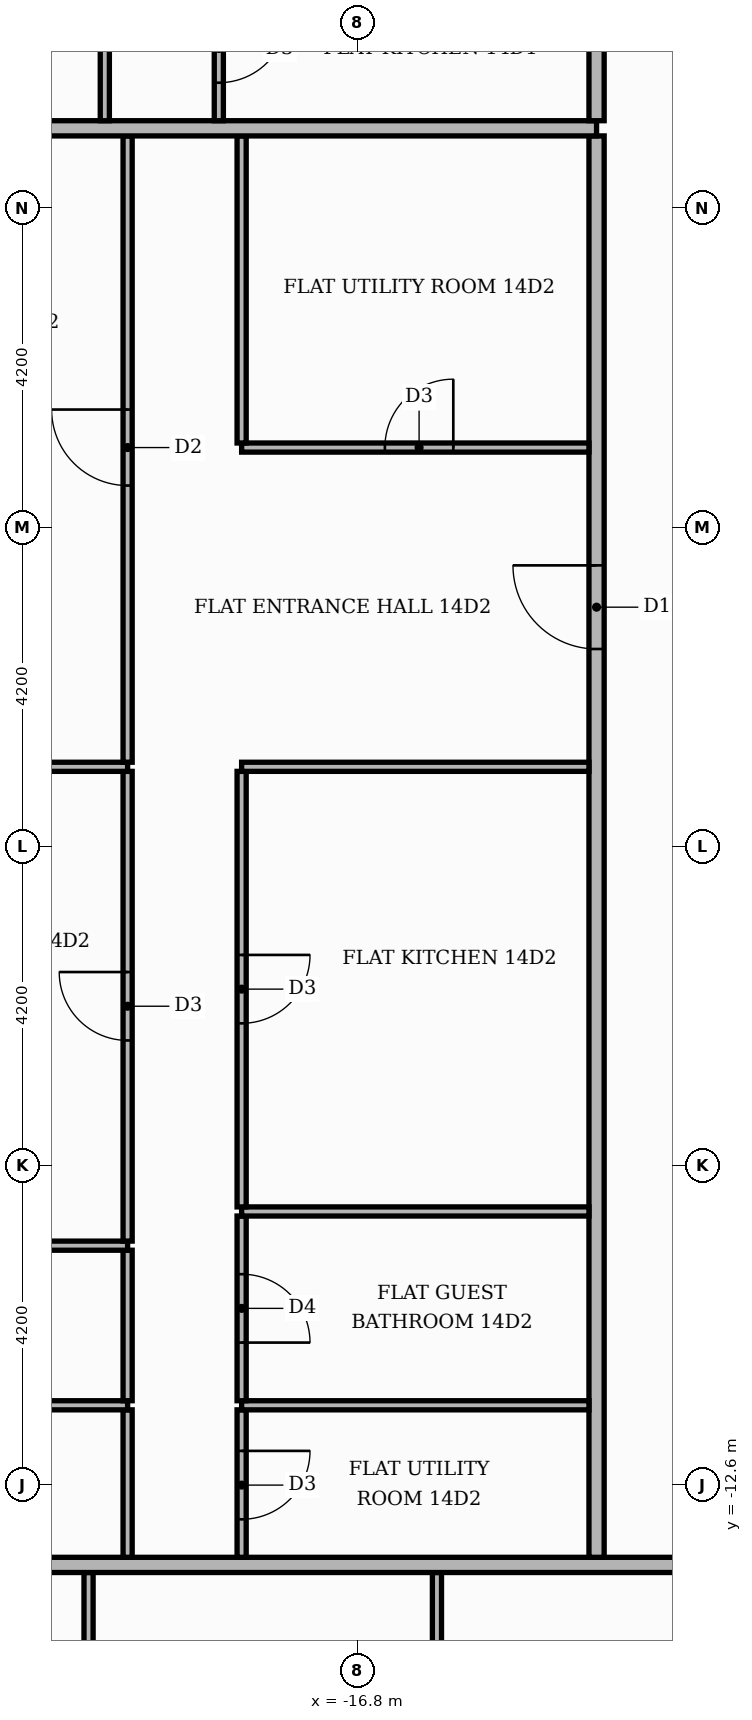
"""IFC4 building model, lengths in metres.
Left out: names, types, materials, properties, quantities, classifications, styles, units other than length and angle.
Written with IfcOpenShell. Run it as: python <this file> out.ifc"""

import sys

from ifc_helpers import new_model, si_unit, direction, frame, frame_2d, origin, place, context, subcontext, project, spatial, rectangle, extrude, element, fill, save


model = new_model("IFC4")
c1 = context("Model", 3, precision=1e-05, world=origin(), true_north=direction((0.0, 1.0)))
c2 = subcontext(c1, "Body", "Model", "MODEL_VIEW")
j1 = project(units=[si_unit("LENGTHUNIT", "METRE"), si_unit("PLANEANGLEUNIT", "RADIAN")], contexts=[c1])
p1 = place(None, origin())
s1 = spatial("IfcSite", under=j1, at=p1, CompositionType="ELEMENT")
p2 = place(p1, origin())
s2 = spatial("IfcBuilding", under=s1, at=p2, CompositionType="ELEMENT")
p3 = place(p2, frame((0.0, 0.0, 62.1)))
s3 = spatial("IfcBuildingStorey", under=s2, at=p3, CompositionType="ELEMENT", Elevation=62.1)
p4 = place(p3, frame((-20.334, -20.66, 0.0), z_axis=(0.0, 0.0, 1.0), x_axis=(0.0, 1.0, 0.0)))
e1 = element("IfcWall", 1, at=p4, inside=s3, PredefinedType="PARTITIONING", context=c2, shape_type="SweptSolid", body=[
    extrude(rectangle(XDim=6.91, YDim=0.12, at=frame_2d((3.455, 0.0))), origin(), (0.0, 0.0, 1.0), 3.48),
])
p5 = place(p4, frame((4.792, 0.0, 0.0)))
e2 = element("IfcOpeningElement", 2, at=p5, cuts=e1, PredefinedType="OPENING", context=c2, shape_type="SweptSolid", body=[
    extrude(rectangle(XDim=0.9, YDim=2.1, at=frame_2d((0.45, 1.05))), frame((0.0, 0.07, 0.0), z_axis=(0.0, -1.0, 0.0), x_axis=(1.0, 0.0, 0.0)), (0.0, 0.0, 1.0), 0.14),
])
p6 = place(p3, frame((-15.75, -20.66, 0.0), z_axis=(0.0, 0.0, 1.0), x_axis=(0.0, 1.0, 0.0)))
e3 = element("IfcWall", 3, at=p6, inside=s3, PredefinedType="PARTITIONING", context=c2, shape_type="SweptSolid", body=[
    extrude(rectangle(XDim=6.91, YDim=0.12, at=frame_2d((3.455, 0.0))), origin(), (0.0, 0.0, 1.0), 3.48),
])
p7 = place(p6, frame((2.975, 0.0, 0.0)))
e4 = element("IfcOpeningElement", 4, at=p7, cuts=e3, PredefinedType="OPENING", context=c2, shape_type="SweptSolid", body=[
    extrude(rectangle(XDim=1.0, YDim=2.1, at=frame_2d((0.5, 1.05))), frame((0.0, 0.07, 0.0), z_axis=(0.0, -1.0, 0.0), x_axis=(1.0, 0.0, 0.0)), (0.0, 0.0, 1.0), 0.14),
])
p8 = place(p3, frame((-25.42, -13.65, 0.0), z_axis=(0.0, 0.0, 1.0), x_axis=(1.0, 0.0, 0.0)))
e5 = element("IfcWall", 5, at=p8, inside=s3, PredefinedType="PARTITIONING", context=c2, shape_type="SweptSolid", body=[
    extrude(rectangle(XDim=39.07, YDim=0.2, at=frame_2d((19.535, 0.0))), origin(), (0.0, 0.0, 1.0), 3.48),
])
p9 = place(p8, frame((13.32, 0.0, 0.0)))
e6 = element("IfcOpeningElement", 6, at=p9, cuts=e5, PredefinedType="OPENING", context=c2, shape_type="SweptSolid", body=[
    extrude(rectangle(XDim=1.1, YDim=2.4, at=frame_2d((0.55, 1.2))), frame((0.0, 0.11, 0.0), z_axis=(0.0, -1.0, 0.0), x_axis=(1.0, 0.0, 0.0)), (0.0, 0.0, 1.0), 0.22),
])
p10 = place(p8, frame((21.72, 0.0, 0.0)))
e7 = element("IfcOpeningElement", 7, at=p10, cuts=e5, PredefinedType="OPENING", context=c2, shape_type="SweptSolid", body=[
    extrude(rectangle(XDim=1.1, YDim=2.4, at=frame_2d((0.55, 1.2))), frame((0.0, 0.11, 0.0), z_axis=(0.0, -1.0, 0.0), x_axis=(1.0, 0.0, 0.0)), (0.0, 0.0, 1.0), 0.22),
])
p11 = place(p3, frame((-19.82, -13.55, 0.0), z_axis=(0.0, 0.0, 1.0), x_axis=(0.0, 1.0, 0.0)))
e8 = element("IfcWall", 8, at=p11, inside=s3, PredefinedType="PARTITIONING", context=c2, shape_type="SweptSolid", body=[
    extrude(rectangle(XDim=1.94, YDim=0.12, at=frame_2d((0.97, 0.0))), origin(), (0.0, 0.0, 1.0), 3.48),
])
p12 = place(p3, frame((-18.32, -13.55, 0.0), z_axis=(0.0, 0.0, 1.0), x_axis=(0.0, 1.0, 0.0)))
e9 = element("IfcWall", 9, at=p12, inside=s3, PredefinedType="PARTITIONING", context=c2, shape_type="SweptSolid", body=[
    extrude(rectangle(XDim=1.94, YDim=0.12, at=frame_2d((0.97, 0.0))), origin(), (0.0, 0.0, 1.0), 3.48),
])
p13 = place(p12, frame((0.5, 0.0, 0.0)))
e10 = element("IfcOpeningElement", 10, at=p13, cuts=e9, PredefinedType="OPENING", context=c2, shape_type="SweptSolid", body=[
    extrude(rectangle(XDim=0.9, YDim=2.1, at=frame_2d((0.45, 1.05))), frame((0.0, 0.07, 0.0), z_axis=(0.0, -1.0, 0.0), x_axis=(1.0, 0.0, 0.0)), (0.0, 0.0, 1.0), 0.14),
])
p14 = place(p3, frame((-13.65, -13.55, 0.0), z_axis=(0.0, 0.0, 1.0), x_axis=(0.0, 1.0, 0.0)))
e11 = element("IfcWall", 11, at=p14, inside=s3, PredefinedType="PARTITIONING", context=c2, shape_type="SweptSolid", body=[
    extrude(rectangle(XDim=18.7, YDim=0.2, at=frame_2d((9.35, 0.0))), origin(), (0.0, 0.0, 1.0), 3.48),
])
p15 = place(p14, frame((11.95, 0.0, 0.0)))
e12 = element("IfcOpeningElement", 12, at=p15, cuts=e11, PredefinedType="OPENING", context=c2, shape_type="SweptSolid", body=[
    extrude(rectangle(XDim=1.1, YDim=2.4, at=frame_2d((0.55, 1.2))), frame((0.0, 0.11, 0.0), z_axis=(0.0, -1.0, 0.0), x_axis=(1.0, 0.0, 0.0)), (0.0, 0.0, 1.0), 0.22),
])
p16 = place(p3, frame((-25.42, -11.55, 0.0), z_axis=(0.0, 0.0, 1.0), x_axis=(1.0, 0.0, 0.0)))
e13 = element("IfcWall", 13, at=p16, inside=s3, PredefinedType="PARTITIONING", context=c2, shape_type="SweptSolid", body=[
    extrude(rectangle(XDim=5.6, YDim=0.12, at=frame_2d((2.8, 0.0))), origin(), (0.0, 0.0, 1.0), 3.48),
])
p17 = place(p16, frame((2.2, 0.0, 0.0)))
e14 = element("IfcOpeningElement", 14, at=p17, cuts=e13, PredefinedType="OPENING", context=c2, shape_type="SweptSolid", body=[
    extrude(rectangle(XDim=0.9, YDim=2.1, at=frame_2d((0.45, 1.05))), frame((0.0, 0.07, 0.0), z_axis=(0.0, -1.0, 0.0), x_axis=(1.0, 0.0, 0.0)), (0.0, 0.0, 1.0), 0.14),
])
p18 = place(p3, frame((-18.32, -11.55, 0.0), z_axis=(0.0, 0.0, 1.0), x_axis=(1.0, 0.0, 0.0)))
e15 = element("IfcWall", 15, at=p18, inside=s3, PredefinedType="PARTITIONING", context=c2, shape_type="SweptSolid", body=[
    extrude(rectangle(XDim=4.57, YDim=0.12, at=frame_2d((2.285, 0.0))), origin(), (0.0, 0.0, 1.0), 3.48),
])
p19 = place(p3, frame((-19.82, -11.49, 0.0), z_axis=(0.0, 0.0, 1.0), x_axis=(0.0, 1.0, 0.0)))
e16 = element("IfcWall", 16, at=p19, inside=s3, PredefinedType="PARTITIONING", context=c2, shape_type="SweptSolid", body=[
    extrude(rectangle(XDim=1.98, YDim=0.12, at=frame_2d((0.99, 0.0))), origin(), (0.0, 0.0, 1.0), 3.48),
])
p20 = place(p3, frame((-18.32, -11.49, 0.0), z_axis=(0.0, 0.0, 1.0), x_axis=(0.0, 1.0, 0.0)))
e17 = element("IfcWall", 17, at=p20, inside=s3, PredefinedType="PARTITIONING", context=c2, shape_type="SweptSolid", body=[
    extrude(rectangle(XDim=2.43, YDim=0.12, at=frame_2d((1.215, 0.0))), origin(), (0.0, 0.0, 1.0), 3.48),
])
p21 = place(p20, frame((0.765, 0.0, 0.0)))
e18 = element("IfcOpeningElement", 18, at=p21, cuts=e17, PredefinedType="OPENING", context=c2, shape_type="SweptSolid", body=[
    extrude(rectangle(XDim=0.9, YDim=2.1, at=frame_2d((0.45, 1.05))), frame((0.0, 0.07, 0.0), z_axis=(0.0, -1.0, 0.0), x_axis=(1.0, 0.0, 0.0)), (0.0, 0.0, 1.0), 0.14),
])
p22 = place(p3, frame((-25.42, -9.45, 0.0), z_axis=(0.0, 0.0, 1.0), x_axis=(1.0, 0.0, 0.0)))
e19 = element("IfcWall", 19, at=p22, inside=s3, PredefinedType="PARTITIONING", context=c2, shape_type="SweptSolid", body=[
    extrude(rectangle(XDim=5.6, YDim=0.12, at=frame_2d((2.8, 0.0))), origin(), (0.0, 0.0, 1.0), 3.48),
])
p23 = place(p22, frame((2.2, 0.0, 0.0)))
e20 = element("IfcOpeningElement", 20, at=p23, cuts=e19, PredefinedType="OPENING", context=c2, shape_type="SweptSolid", body=[
    extrude(rectangle(XDim=0.9, YDim=2.1, at=frame_2d((0.45, 1.05))), frame((0.0, 0.07, 0.0), z_axis=(0.0, -1.0, 0.0), x_axis=(1.0, 0.0, 0.0)), (0.0, 0.0, 1.0), 0.14),
])
p24 = place(p3, frame((-19.82, -9.39, 0.0), z_axis=(0.0, 0.0, 1.0), x_axis=(0.0, 1.0, 0.0)))
e21 = element("IfcWall", 21, at=p24, inside=s3, PredefinedType="PARTITIONING", context=c2, shape_type="SweptSolid", body=[
    extrude(rectangle(XDim=6.18, YDim=0.12, at=frame_2d((3.09, 0.0))), origin(), (0.0, 0.0, 1.0), 3.48),
])
p25 = place(p24, frame((2.64, 0.0, 0.0)))
e22 = element("IfcOpeningElement", 22, at=p25, cuts=e21, PredefinedType="OPENING", context=c2, shape_type="SweptSolid", body=[
    extrude(rectangle(XDim=0.9, YDim=2.1, at=frame_2d((0.45, 1.05))), frame((0.0, 0.07, 0.0), z_axis=(0.0, -1.0, 0.0), x_axis=(1.0, 0.0, 0.0)), (0.0, 0.0, 1.0), 0.14),
])
p26 = place(p3, frame((-18.32, -9.0, 0.0), z_axis=(0.0, 0.0, 1.0), x_axis=(1.0, 0.0, 0.0)))
e23 = element("IfcWall", 23, at=p26, inside=s3, PredefinedType="PARTITIONING", context=c2, shape_type="SweptSolid", body=[
    extrude(rectangle(XDim=4.57, YDim=0.12, at=frame_2d((2.285, 0.0))), origin(), (0.0, 0.0, 1.0), 3.48),
])
p27 = place(p3, frame((-18.32, -8.94, 0.0), z_axis=(0.0, 0.0, 1.0), x_axis=(0.0, 1.0, 0.0)))
e24 = element("IfcWall", 24, at=p27, inside=s3, PredefinedType="PARTITIONING", context=c2, shape_type="SweptSolid", body=[
    extrude(rectangle(XDim=5.73, YDim=0.12, at=frame_2d((2.865, 0.0))), origin(), (0.0, 0.0, 1.0), 3.48),
])
p28 = place(p27, frame((2.415, 0.0, 0.0)))
e25 = element("IfcOpeningElement", 25, at=p28, cuts=e24, PredefinedType="OPENING", context=c2, shape_type="SweptSolid", body=[
    extrude(rectangle(XDim=0.9, YDim=2.1, at=frame_2d((0.45, 1.05))), frame((0.0, 0.07, 0.0), z_axis=(0.0, -1.0, 0.0), x_axis=(1.0, 0.0, 0.0)), (0.0, 0.0, 1.0), 0.14),
])
p29 = place(p3, frame((-25.42, -3.15, 0.0), z_axis=(0.0, 0.0, 1.0), x_axis=(1.0, 0.0, 0.0)))
e26 = element("IfcWall", 26, at=p29, inside=s3, PredefinedType="PARTITIONING", context=c2, shape_type="SweptSolid", body=[
    extrude(rectangle(XDim=5.6, YDim=0.12, at=frame_2d((2.8, 0.0))), origin(), (0.0, 0.0, 1.0), 3.48),
])
p30 = place(p3, frame((-18.32, -3.15, 0.0), z_axis=(0.0, 0.0, 1.0), x_axis=(1.0, 0.0, 0.0)))
e27 = element("IfcWall", 27, at=p30, inside=s3, PredefinedType="PARTITIONING", context=c2, shape_type="SweptSolid", body=[
    extrude(rectangle(XDim=4.57, YDim=0.12, at=frame_2d((2.285, 0.0))), origin(), (0.0, 0.0, 1.0), 3.48),
])
p31 = place(p3, frame((-19.82, -3.09, 0.0), z_axis=(0.0, 0.0, 1.0), x_axis=(0.0, 1.0, 0.0)))
e28 = element("IfcWall", 28, at=p31, inside=s3, PredefinedType="PARTITIONING", context=c2, shape_type="SweptSolid", body=[
    extrude(rectangle(XDim=8.24, YDim=0.12, at=frame_2d((4.12, 0.0))), origin(), (0.0, 0.0, 1.0), 3.48),
])
p32 = place(p31, frame((3.64, 0.0, 0.0)))
e29 = element("IfcOpeningElement", 29, at=p32, cuts=e28, PredefinedType="OPENING", context=c2, shape_type="SweptSolid", body=[
    extrude(rectangle(XDim=1.0, YDim=2.1, at=frame_2d((0.5, 1.05))), frame((0.0, 0.07, 0.0), z_axis=(0.0, -1.0, 0.0), x_axis=(1.0, 0.0, 0.0)), (0.0, 0.0, 1.0), 0.14),
])
p33 = place(p3, frame((-18.32, 1.05, 0.0), z_axis=(0.0, 0.0, 1.0), x_axis=(1.0, 0.0, 0.0)))
e30 = element("IfcWall", 30, at=p33, inside=s3, PredefinedType="PARTITIONING", context=c2, shape_type="SweptSolid", body=[
    extrude(rectangle(XDim=4.57, YDim=0.12, at=frame_2d((2.285, 0.0))), origin(), (0.0, 0.0, 1.0), 3.48),
])
p34 = place(p33, frame((1.885, 0.0, 0.0)))
e31 = element("IfcOpeningElement", 31, at=p34, cuts=e30, PredefinedType="OPENING", context=c2, shape_type="SweptSolid", body=[
    extrude(rectangle(XDim=0.9, YDim=2.1, at=frame_2d((0.45, 1.05))), frame((0.0, 0.07, 0.0), z_axis=(0.0, -1.0, 0.0), x_axis=(1.0, 0.0, 0.0)), (0.0, 0.0, 1.0), 0.14),
])
p35 = place(p3, frame((-18.32, 1.11, 0.0), z_axis=(0.0, 0.0, 1.0), x_axis=(0.0, 1.0, 0.0)))
e32 = element("IfcWall", 32, at=p35, inside=s3, PredefinedType="PARTITIONING", context=c2, shape_type="SweptSolid", body=[
    extrude(rectangle(XDim=4.04, YDim=0.12, at=frame_2d((2.02, 0.0))), origin(), (0.0, 0.0, 1.0), 3.48),
])
p36 = place(p3, frame((-25.42, 5.25, 0.0), z_axis=(0.0, 0.0, 1.0), x_axis=(1.0, 0.0, 0.0)))
e33 = element("IfcWall", 33, at=p36, inside=s3, PredefinedType="PARTITIONING", context=c2, shape_type="SweptSolid", body=[
    extrude(rectangle(XDim=11.77, YDim=0.2, at=frame_2d((5.885, 0.0))), origin(), (0.0, 0.0, 1.0), 3.48),
])
p37 = place(p3, frame((-20.12, 5.35, 0.0), z_axis=(0.0, 0.0, 1.0), x_axis=(0.0, 1.0, 0.0)))
e34 = element("IfcWall", 34, at=p37, inside=s3, PredefinedType="PARTITIONING", context=c2, shape_type="SweptSolid", body=[
    extrude(rectangle(XDim=1.94, YDim=0.12, at=frame_2d((0.97, 0.0))), origin(), (0.0, 0.0, 1.0), 3.48),
])
p38 = place(p3, frame((-18.62, 5.35, 0.0), z_axis=(0.0, 0.0, 1.0), x_axis=(0.0, 1.0, 0.0)))
e35 = element("IfcWall", 35, at=p38, inside=s3, PredefinedType="PARTITIONING", context=c2, shape_type="SweptSolid", body=[
    extrude(rectangle(XDim=1.94, YDim=0.12, at=frame_2d((0.97, 0.0))), origin(), (0.0, 0.0, 1.0), 3.48),
])
p39 = place(p38, frame((0.5, 0.0, 0.0)))
e36 = element("IfcOpeningElement", 36, at=p39, cuts=e35, PredefinedType="OPENING", context=c2, shape_type="SweptSolid", body=[
    extrude(rectangle(XDim=0.9, YDim=2.1, at=frame_2d((0.45, 1.05))), frame((0.0, 0.07, 0.0), z_axis=(0.0, -1.0, 0.0), x_axis=(1.0, 0.0, 0.0)), (0.0, 0.0, 1.0), 0.14),
])
p40 = place(p3, frame((-13.65, 5.35, 0.0), z_axis=(0.0, 0.0, 1.0), x_axis=(0.0, 1.0, 0.0)))
e37 = element("IfcWall", 37, at=p40, inside=s3, PredefinedType="PARTITIONING", context=c2, shape_type="SweptSolid", body=[
    extrude(rectangle(XDim=8.2, YDim=0.2, at=frame_2d((4.1, 0.0))), origin(), (0.0, 0.0, 1.0), 3.48),
])
p41 = place(p40, frame((5.65, 0.0, 0.0)))
e38 = element("IfcOpeningElement", 38, at=p41, cuts=e37, PredefinedType="OPENING", context=c2, shape_type="SweptSolid", body=[
    extrude(rectangle(XDim=1.1, YDim=2.4, at=frame_2d((0.55, 1.2))), frame((0.0, 0.11, 0.0), z_axis=(0.0, -1.0, 0.0), x_axis=(1.0, 0.0, 0.0)), (0.0, 0.0, 1.0), 0.22),
])
p42 = place(p39, frame((0.9, 0.0, 0.0), z_axis=(0.0, 0.0, 1.0), x_axis=(-1.0, 0.0, 0.0)))
e39 = element("IfcDoor", 39, at=p42, inside=s3, OperationType="SINGLE_SWING_RIGHT", PredefinedType="DOOR", context=c2, shape_type="SweptSolid", body=[
    extrude(rectangle(XDim=0.9, YDim=2.1, at=frame_2d((0.45, 1.05))), frame((0.0, 0.025, 0.0), z_axis=(0.0, -1.0, 0.0), x_axis=(1.0, 0.0, 0.0)), (0.0, 0.0, 1.0), 0.05),
])
fill(e36, e39)
p43 = place(p15, origin())
e40 = element("IfcDoor", 40, at=p43, inside=s3, OperationType="SINGLE_SWING_RIGHT", PredefinedType="DOOR", context=c2, shape_type="SweptSolid", body=[
    extrude(rectangle(XDim=1.1, YDim=2.4, at=frame_2d((0.55, 1.2))), frame((0.0, 0.025, 0.0), z_axis=(0.0, -1.0, 0.0), x_axis=(1.0, 0.0, 0.0)), (0.0, 0.0, 1.0), 0.05),
])
fill(e12, e40)
p44 = place(p34, origin())
e41 = element("IfcDoor", 41, at=p44, inside=s3, OperationType="SINGLE_SWING_RIGHT", PredefinedType="DOOR", context=c2, shape_type="SweptSolid", body=[
    extrude(rectangle(XDim=0.9, YDim=2.1, at=frame_2d((0.45, 1.05))), frame((0.0, 0.025, 0.0), z_axis=(0.0, -1.0, 0.0), x_axis=(1.0, 0.0, 0.0)), (0.0, 0.0, 1.0), 0.05),
])
fill(e31, e41)
p45 = place(p28, frame((0.9, 0.0, 0.0), z_axis=(0.0, 0.0, 1.0), x_axis=(-1.0, 0.0, 0.0)))
e42 = element("IfcDoor", 42, at=p45, inside=s3, OperationType="SINGLE_SWING_RIGHT", PredefinedType="DOOR", context=c2, shape_type="SweptSolid", body=[
    extrude(rectangle(XDim=0.9, YDim=2.1, at=frame_2d((0.45, 1.05))), frame((0.0, 0.025, 0.0), z_axis=(0.0, -1.0, 0.0), x_axis=(1.0, 0.0, 0.0)), (0.0, 0.0, 1.0), 0.05),
])
fill(e25, e42)
p46 = place(p21, frame((0.9, 0.0, 0.0), z_axis=(0.0, 0.0, 1.0), x_axis=(-1.0, 0.0, 0.0)))
e43 = element("IfcDoor", 43, at=p46, inside=s3, OperationType="SINGLE_SWING_LEFT", PredefinedType="DOOR", context=c2, shape_type="SweptSolid", body=[
    extrude(rectangle(XDim=0.9, YDim=2.1, at=frame_2d((0.45, 1.05))), frame((0.0, 0.025, 0.0), z_axis=(0.0, -1.0, 0.0), x_axis=(1.0, 0.0, 0.0)), (0.0, 0.0, 1.0), 0.05),
])
fill(e18, e43)
p47 = place(p13, frame((0.9, 0.0, 0.0), z_axis=(0.0, 0.0, 1.0), x_axis=(-1.0, 0.0, 0.0)))
e44 = element("IfcDoor", 44, at=p47, inside=s3, OperationType="SINGLE_SWING_RIGHT", PredefinedType="DOOR", context=c2, shape_type="SweptSolid", body=[
    extrude(rectangle(XDim=0.9, YDim=2.1, at=frame_2d((0.45, 1.05))), frame((0.0, 0.025, 0.0), z_axis=(0.0, -1.0, 0.0), x_axis=(1.0, 0.0, 0.0)), (0.0, 0.0, 1.0), 0.05),
])
fill(e10, e44)
p48 = place(p32, origin())
e45 = element("IfcDoor", 45, at=p48, inside=s3, OperationType="SINGLE_SWING_RIGHT", PredefinedType="DOOR", context=c2, shape_type="SweptSolid", body=[
    extrude(rectangle(XDim=1.0, YDim=2.1, at=frame_2d((0.5, 1.05))), frame((0.0, 0.025, 0.0), z_axis=(0.0, -1.0, 0.0), x_axis=(1.0, 0.0, 0.0)), (0.0, 0.0, 1.0), 0.05),
])
fill(e29, e45)
p49 = place(p25, origin())
e46 = element("IfcDoor", 46, at=p49, inside=s3, OperationType="SINGLE_SWING_RIGHT", PredefinedType="DOOR", context=c2, shape_type="SweptSolid", body=[
    extrude(rectangle(XDim=0.9, YDim=2.1, at=frame_2d((0.45, 1.05))), frame((0.0, 0.025, 0.0), z_axis=(0.0, -1.0, 0.0), x_axis=(1.0, 0.0, 0.0)), (0.0, 0.0, 1.0), 0.05),
])
fill(e22, e46)
save(model, sys.argv[1])
